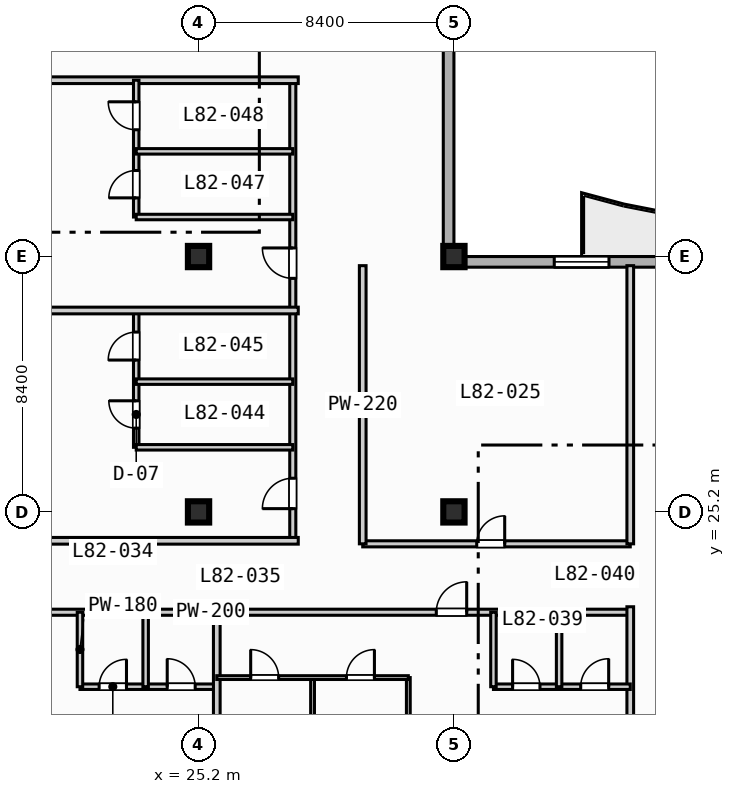
"""IFC4 building model, lengths in metres.
Left out: names, types, materials, properties, quantities, classifications, styles, units other than length and angle.
Written with IfcOpenShell. Run it as: python <this file> out.ifc"""

import sys

from ifc_helpers import new_model, si_unit, direction, frame, frame_2d, origin, origin_2d, place, context, subcontext, project, spatial, rectangle, extrude, element, fill, save


model = new_model("IFC4")
c1 = context("Model", 3, precision=1e-05, world=origin(), true_north=direction((0.0, 1.0)))
c2 = subcontext(c1, "Body", "Model", "MODEL_VIEW")
j1 = project(units=[si_unit("LENGTHUNIT", "METRE"), si_unit("PLANEANGLEUNIT", "RADIAN")], contexts=[c1])
p1 = place(None, origin())
s1 = spatial("IfcSite", under=j1, at=p1, CompositionType="ELEMENT")
p2 = place(p1, origin())
s2 = spatial("IfcBuilding", under=s1, at=p2, CompositionType="ELEMENT")
p3 = place(p2, frame((0.0, 0.0, 332.0)))
s3 = spatial("IfcBuildingStorey", under=s2, at=p3, CompositionType="ELEMENT", Elevation=332.0)
for number, where, z_axis, x_axis in (
    (1, (25.2, 25.2, 0.0), (0.0, 0.0, 1.0), (1.0, 0.0, 0.0)),
    (2, (25.2, 33.6, 0.0), (0.0, 0.0, 1.0), (1.0, 0.0, 0.0)),
    (3, (33.6, 25.2, 0.0), (0.0, 0.0, 1.0), (1.0, 0.0, 0.0)),
    (4, (33.6, 33.6, 0.0), (0.0, 0.0, 1.0), (1.0, 0.0, 0.0)),
):
    element("IfcColumn", number, at=place(p3, frame(where, z_axis=z_axis, x_axis=x_axis)), inside=s3, PredefinedType="COLUMN", context=c2, shape_type="SweptSolid", body=[
        extrude(rectangle(XDim=0.7, YDim=0.7, at=origin_2d()), origin(), (0.0, 0.0, 1.0), 3.9),
    ])
p4 = place(p3, frame((33.425, 72.425, 0.0), z_axis=(0.0, 0.0, 1.0), x_axis=(0.0, -1.0, 0.0)))
e5 = element("IfcWall", 5, at=p4, inside=s3, PredefinedType="STANDARD", context=c2, shape_type="SweptSolid", body=[
    extrude(rectangle(XDim=39.0, YDim=0.35, at=frame_2d((19.5, 0.0))), origin(), (0.0, 0.0, 1.0), 3.67),
])
p5 = place(p4, frame((5.9, 0.0, 0.85)))
e6 = element("IfcOpeningElement", 6, at=p5, cuts=e5, PredefinedType="OPENING", context=c2, shape_type="SweptSolid", body=[
    extrude(rectangle(XDim=1.8, YDim=1.8, at=frame_2d((0.9, 0.9))), frame((0.0, 0.185, 0.0), z_axis=(0.0, -1.0, 0.0), x_axis=(1.0, 0.0, 0.0)), (0.0, 0.0, 1.0), 0.37),
])
p6 = place(p3, frame((33.425, 33.425, 0.0), z_axis=(0.0, 0.0, 1.0), x_axis=(1.0, 0.0, 0.0)))
e7 = element("IfcWall", 7, at=p6, inside=s3, PredefinedType="STANDARD", context=c2, shape_type="SweptSolid", body=[
    extrude(rectangle(XDim=30.6, YDim=0.35, at=frame_2d((15.3, 0.0))), origin(), (0.0, 0.0, 1.0), 3.67),
])
p7 = place(p6, frame((12.075, 0.0, 0.0)))
e8 = element("IfcOpeningElement", 8, at=p7, cuts=e7, PredefinedType="OPENING", context=c2, shape_type="SweptSolid", body=[
    extrude(rectangle(XDim=1.4, YDim=2.2, at=frame_2d((0.7, 1.1))), frame((0.0, 0.185, 0.0), z_axis=(0.0, -1.0, 0.0), x_axis=(1.0, 0.0, 0.0)), (0.0, 0.0, 1.0), 0.37),
])
p8 = place(p6, frame((3.475, 0.0, 0.85)))
e9 = element("IfcOpeningElement", 9, at=p8, cuts=e7, PredefinedType="OPENING", context=c2, shape_type="SweptSolid", body=[
    extrude(rectangle(XDim=1.8, YDim=1.8, at=frame_2d((0.9, 0.9))), frame((0.0, 0.185, 0.0), z_axis=(0.0, -1.0, 0.0), x_axis=(1.0, 0.0, 0.0)), (0.0, 0.0, 1.0), 0.37),
])
p9 = place(p3, frame((30.6, 24.15, 0.0), z_axis=(0.0, 0.0, 1.0), x_axis=(1.0, 0.0, 0.0)))
e10 = element("IfcWall", 10, at=p9, inside=s3, PredefinedType="PARTITIONING", context=c2, shape_type="SweptSolid", body=[
    extrude(rectangle(XDim=8.8, YDim=0.2, at=frame_2d((4.4, 0.0))), origin(), (0.0, 0.0, 1.0), 3.67),
])
p10 = place(p9, frame((3.75, 0.0, 0.0)))
e11 = element("IfcOpeningElement", 11, at=p10, cuts=e10, PredefinedType="OPENING", context=c2, shape_type="SweptSolid", body=[
    extrude(rectangle(XDim=0.92, YDim=2.1, at=frame_2d((0.46, 1.05))), frame((0.0, 0.11, 0.0), z_axis=(0.0, -1.0, 0.0), x_axis=(1.0, 0.0, 0.0)), (0.0, 0.0, 1.0), 0.22),
])
for number, where, z_axis, x_axis in (
    (12, (30.6, 24.15, 0.0), (0.0, 0.0, 1.0), (0.0, 1.0, 0.0)),
    (13, (39.4, 24.15, 0.0), (0.0, 0.0, 1.0), (0.0, 1.0, 0.0)),
):
    element("IfcWall", number, at=place(p3, frame(where, z_axis=z_axis, x_axis=x_axis)), inside=s3, PredefinedType="PARTITIONING", context=c2, shape_type="SweptSolid", body=[
        extrude(rectangle(XDim=9.15, YDim=0.22, at=frame_2d((4.575, 0.0))), origin(), (0.0, 0.0, 1.0), 3.67),
    ])
p11 = place(p3, frame((11.8, 21.9, 0.0), z_axis=(0.0, 0.0, 1.0), x_axis=(1.0, 0.0, 0.0)))
e14 = element("IfcWall", 14, at=p11, inside=s3, PredefinedType="PARTITIONING", context=c2, shape_type="SweptSolid", body=[
    extrude(rectangle(XDim=27.6, YDim=0.2, at=frame_2d((13.8, 0.0))), origin(), (0.0, 0.0, 1.0), 3.67),
])
p12 = place(p11, frame((7.42, 0.0, 0.0)))
e15 = element("IfcOpeningElement", 15, at=p12, cuts=e14, PredefinedType="OPENING", context=c2, shape_type="SweptSolid", body=[
    extrude(rectangle(XDim=1.0, YDim=2.15, at=frame_2d((0.5, 1.075))), frame((0.0, 0.11, 0.0), z_axis=(0.0, -1.0, 0.0), x_axis=(1.0, 0.0, 0.0)), (0.0, 0.0, 1.0), 0.22),
])
p13 = place(p11, frame((21.22, 0.0, 0.0)))
e16 = element("IfcOpeningElement", 16, at=p13, cuts=e14, PredefinedType="OPENING", context=c2, shape_type="SweptSolid", body=[
    extrude(rectangle(XDim=1.0, YDim=2.15, at=frame_2d((0.5, 1.075))), frame((0.0, 0.11, 0.0), z_axis=(0.0, -1.0, 0.0), x_axis=(1.0, 0.0, 0.0)), (0.0, 0.0, 1.0), 0.22),
])
p14 = place(p3, frame((21.3, 19.45, 0.0), z_axis=(0.0, 0.0, 1.0), x_axis=(1.0, 0.0, 0.0)))
e17 = element("IfcWall", 17, at=p14, inside=s3, PredefinedType="PLUMBINGWALL", context=c2, shape_type="SweptSolid", body=[
    extrude(rectangle(XDim=4.5, YDim=0.18, at=frame_2d((2.25, 0.0))), origin(), (0.0, 0.0, 1.0), 3.67),
])
p15 = place(p14, frame((0.63, 0.0, 0.0)))
e18 = element("IfcOpeningElement", 18, at=p15, cuts=e17, PredefinedType="OPENING", context=c2, shape_type="SweptSolid", body=[
    extrude(rectangle(XDim=0.9, YDim=2.1, at=frame_2d((0.45, 1.05))), frame((0.0, 0.1, 0.0), z_axis=(0.0, -1.0, 0.0), x_axis=(1.0, 0.0, 0.0)), (0.0, 0.0, 1.0), 0.2),
])
p16 = place(p14, frame((2.87, 0.0, 0.0)))
e19 = element("IfcOpeningElement", 19, at=p16, cuts=e17, PredefinedType="OPENING", context=c2, shape_type="SweptSolid", body=[
    extrude(rectangle(XDim=0.92, YDim=2.1, at=frame_2d((0.46, 1.05))), frame((0.0, 0.1, 0.0), z_axis=(0.0, -1.0, 0.0), x_axis=(1.0, 0.0, 0.0)), (0.0, 0.0, 1.0), 0.2),
])
for number, where, z_axis, x_axis in (
    (20, (21.3, 19.45, 0.0), (0.0, 0.0, 1.0), (0.0, 1.0, 0.0)),
    (21, (23.46, 19.45, 0.0), (0.0, 0.0, 1.0), (0.0, 1.0, 0.0)),
):
    element("IfcWall", number, at=place(p3, frame(where, z_axis=z_axis, x_axis=x_axis)), inside=s3, PredefinedType="PLUMBINGWALL", context=c2, shape_type="SweptSolid", body=[
        extrude(rectangle(XDim=2.45, YDim=0.18, at=frame_2d((1.225, 0.0))), origin(), (0.0, 0.0, 1.0), 3.67),
    ])
for number, where, z_axis, x_axis in (
    (22, (25.8, 8.6, 0.0), (0.0, 0.0, 1.0), (0.0, 1.0, 0.0)),
    (23, (39.4, 8.6, 0.0), (0.0, 0.0, 1.0), (0.0, 1.0, 0.0)),
):
    element("IfcWall", number, at=place(p3, frame(where, z_axis=z_axis, x_axis=x_axis)), inside=s3, PredefinedType="PARTITIONING", context=c2, shape_type="SweptSolid", body=[
        extrude(rectangle(XDim=13.48, YDim=0.22, at=frame_2d((6.74, 0.0))), origin(), (0.0, 0.0, 1.0), 3.67),
    ])
p17 = place(p3, frame((34.9, 19.45, 0.0), z_axis=(0.0, 0.0, 1.0), x_axis=(1.0, 0.0, 0.0)))
e24 = element("IfcWall", 24, at=p17, inside=s3, PredefinedType="PLUMBINGWALL", context=c2, shape_type="SweptSolid", body=[
    extrude(rectangle(XDim=4.5, YDim=0.18, at=frame_2d((2.25, 0.0))), origin(), (0.0, 0.0, 1.0), 3.67),
])
p18 = place(p17, frame((0.63, 0.0, 0.0)))
e25 = element("IfcOpeningElement", 25, at=p18, cuts=e24, PredefinedType="OPENING", context=c2, shape_type="SweptSolid", body=[
    extrude(rectangle(XDim=0.9, YDim=2.1, at=frame_2d((0.45, 1.05))), frame((0.0, 0.1, 0.0), z_axis=(0.0, -1.0, 0.0), x_axis=(1.0, 0.0, 0.0)), (0.0, 0.0, 1.0), 0.2),
])
p19 = place(p17, frame((2.87, 0.0, 0.0)))
e26 = element("IfcOpeningElement", 26, at=p19, cuts=e24, PredefinedType="OPENING", context=c2, shape_type="SweptSolid", body=[
    extrude(rectangle(XDim=0.92, YDim=2.1, at=frame_2d((0.46, 1.05))), frame((0.0, 0.1, 0.0), z_axis=(0.0, -1.0, 0.0), x_axis=(1.0, 0.0, 0.0)), (0.0, 0.0, 1.0), 0.2),
])
for number, where, z_axis, x_axis in (
    (27, (34.9, 19.45, 0.0), (0.0, 0.0, 1.0), (0.0, 1.0, 0.0)),
    (28, (37.06, 19.45, 0.0), (0.0, 0.0, 1.0), (0.0, 1.0, 0.0)),
):
    element("IfcWall", number, at=place(p3, frame(where, z_axis=z_axis, x_axis=x_axis)), inside=s3, PredefinedType="PLUMBINGWALL", context=c2, shape_type="SweptSolid", body=[
        extrude(rectangle(XDim=2.45, YDim=0.18, at=frame_2d((1.225, 0.0))), origin(), (0.0, 0.0, 1.0), 3.67),
    ])
for number, where, z_axis, x_axis in (
    (29, (28.95, 8.75, 0.0), (0.0, 0.0, 1.0), (0.0, 1.0, 0.0)),
    (30, (32.1, 8.75, 0.0), (0.0, 0.0, 1.0), (0.0, 1.0, 0.0)),
):
    element("IfcWall", number, at=place(p3, frame(where, z_axis=z_axis, x_axis=x_axis)), inside=s3, PredefinedType="PARTITIONING", context=c2, shape_type="SweptSolid", body=[
        extrude(rectangle(XDim=11.0, YDim=0.125, at=frame_2d((5.5, 0.0))), origin(), (0.0, 0.0, 1.0), 3.67),
    ])
p20 = place(p3, frame((25.8, 19.75, 0.0), z_axis=(0.0, 0.0, 1.0), x_axis=(1.0, 0.0, 0.0)))
e31 = element("IfcWall", 31, at=p20, inside=s3, PredefinedType="PARTITIONING", context=c2, shape_type="SweptSolid", body=[
    extrude(rectangle(XDim=6.3, YDim=0.125, at=frame_2d((3.15, 0.0))), origin(), (0.0, 0.0, 1.0), 3.67),
])
p21 = place(p20, frame((1.115, 0.0, 0.0)))
e32 = element("IfcOpeningElement", 32, at=p21, cuts=e31, PredefinedType="OPENING", context=c2, shape_type="SweptSolid", body=[
    extrude(rectangle(XDim=0.92, YDim=2.1, at=frame_2d((0.46, 1.05))), frame((0.0, 0.073, 0.0), z_axis=(0.0, -1.0, 0.0), x_axis=(1.0, 0.0, 0.0)), (0.0, 0.0, 1.0), 0.145),
])
p22 = place(p20, frame((4.265, 0.0, 0.0)))
e33 = element("IfcOpeningElement", 33, at=p22, cuts=e31, PredefinedType="OPENING", context=c2, shape_type="SweptSolid", body=[
    extrude(rectangle(XDim=0.92, YDim=2.1, at=frame_2d((0.46, 1.05))), frame((0.0, 0.073, 0.0), z_axis=(0.0, -1.0, 0.0), x_axis=(1.0, 0.0, 0.0)), (0.0, 0.0, 1.0), 0.145),
])
p23 = place(p3, frame((28.3, 24.25, 0.0), z_axis=(0.0, 0.0, 1.0), x_axis=(0.0, 1.0, 0.0)))
e34 = element("IfcWall", 34, at=p23, inside=s3, PredefinedType="PARTITIONING", context=c2, shape_type="SweptSolid", body=[
    extrude(rectangle(XDim=15.15, YDim=0.2, at=frame_2d((7.575, 0.0))), origin(), (0.0, 0.0, 1.0), 3.67),
])
p24 = place(p23, frame((1.058, 0.0, 0.0)))
e35 = element("IfcOpeningElement", 35, at=p24, cuts=e34, PredefinedType="OPENING", context=c2, shape_type="SweptSolid", body=[
    extrude(rectangle(XDim=1.0, YDim=2.15, at=frame_2d((0.5, 1.075))), frame((0.0, 0.11, 0.0), z_axis=(0.0, -1.0, 0.0), x_axis=(1.0, 0.0, 0.0)), (0.0, 0.0, 1.0), 0.22),
])
p25 = place(p23, frame((8.633, 0.0, 0.0)))
e36 = element("IfcOpeningElement", 36, at=p25, cuts=e34, PredefinedType="OPENING", context=c2, shape_type="SweptSolid", body=[
    extrude(rectangle(XDim=1.0, YDim=2.15, at=frame_2d((0.5, 1.075))), frame((0.0, 0.11, 0.0), z_axis=(0.0, -1.0, 0.0), x_axis=(1.0, 0.0, 0.0)), (0.0, 0.0, 1.0), 0.22),
])
p26 = place(p3, frame((8.6, 24.25, 0.0), z_axis=(0.0, 0.0, 1.0), x_axis=(1.0, 0.0, 0.0)))
e37 = element("IfcWall", 37, at=p26, inside=s3, PredefinedType="PARTITIONING", context=c2, shape_type="SweptSolid", body=[
    extrude(rectangle(XDim=19.88, YDim=0.22, at=frame_2d((9.94, 0.0))), origin(), (0.0, 0.0, 1.0), 3.67),
])
p27 = place(p3, frame((23.15, 27.325, 0.0), z_axis=(0.0, 0.0, 1.0), x_axis=(0.0, 1.0, 0.0)))
e38 = element("IfcWall", 38, at=p27, inside=s3, PredefinedType="PLUMBINGWALL", context=c2, shape_type="SweptSolid", body=[
    extrude(rectangle(XDim=4.5, YDim=0.18, at=frame_2d((2.25, 0.0))), origin(), (0.0, 0.0, 1.0), 3.67),
])
p28 = place(p27, frame((0.63, 0.0, 0.0)))
e39 = element("IfcOpeningElement", 39, at=p28, cuts=e38, PredefinedType="OPENING", context=c2, shape_type="SweptSolid", body=[
    extrude(rectangle(XDim=0.9, YDim=2.1, at=frame_2d((0.45, 1.05))), frame((0.0, 0.1, 0.0), z_axis=(0.0, -1.0, 0.0), x_axis=(1.0, 0.0, 0.0)), (0.0, 0.0, 1.0), 0.2),
])
p29 = place(p27, frame((2.87, 0.0, 0.0)))
e40 = element("IfcOpeningElement", 40, at=p29, cuts=e38, PredefinedType="OPENING", context=c2, shape_type="SweptSolid", body=[
    extrude(rectangle(XDim=0.92, YDim=2.1, at=frame_2d((0.46, 1.05))), frame((0.0, 0.1, 0.0), z_axis=(0.0, -1.0, 0.0), x_axis=(1.0, 0.0, 0.0)), (0.0, 0.0, 1.0), 0.2),
])
for number, where, z_axis, x_axis in (
    (41, (23.15, 27.325, 0.0), (0.0, 0.0, 1.0), (1.0, 0.0, 0.0)),
    (42, (23.15, 29.485, 0.0), (0.0, 0.0, 1.0), (1.0, 0.0, 0.0)),
):
    element("IfcWall", number, at=place(p3, frame(where, z_axis=z_axis, x_axis=x_axis)), inside=s3, PredefinedType="PLUMBINGWALL", context=c2, shape_type="SweptSolid", body=[
        extrude(rectangle(XDim=5.15, YDim=0.18, at=frame_2d((2.575, 0.0))), origin(), (0.0, 0.0, 1.0), 3.67),
    ])
for number, where, z_axis, x_axis in (
    (43, (8.6, 31.825, 0.0), (0.0, 0.0, 1.0), (1.0, 0.0, 0.0)),
    (44, (8.6, 39.4, 0.0), (0.0, 0.0, 1.0), (1.0, 0.0, 0.0)),
):
    element("IfcWall", number, at=place(p3, frame(where, z_axis=z_axis, x_axis=x_axis)), inside=s3, PredefinedType="PARTITIONING", context=c2, shape_type="SweptSolid", body=[
        extrude(rectangle(XDim=19.88, YDim=0.22, at=frame_2d((9.94, 0.0))), origin(), (0.0, 0.0, 1.0), 3.67),
    ])
p30 = place(p3, frame((23.15, 34.9, 0.0), z_axis=(0.0, 0.0, 1.0), x_axis=(0.0, 1.0, 0.0)))
e45 = element("IfcWall", 45, at=p30, inside=s3, PredefinedType="PLUMBINGWALL", context=c2, shape_type="SweptSolid", body=[
    extrude(rectangle(XDim=4.5, YDim=0.18, at=frame_2d((2.25, 0.0))), origin(), (0.0, 0.0, 1.0), 3.67),
])
p31 = place(p30, frame((0.63, 0.0, 0.0)))
e46 = element("IfcOpeningElement", 46, at=p31, cuts=e45, PredefinedType="OPENING", context=c2, shape_type="SweptSolid", body=[
    extrude(rectangle(XDim=0.9, YDim=2.1, at=frame_2d((0.45, 1.05))), frame((0.0, 0.1, 0.0), z_axis=(0.0, -1.0, 0.0), x_axis=(1.0, 0.0, 0.0)), (0.0, 0.0, 1.0), 0.2),
])
p32 = place(p30, frame((2.87, 0.0, 0.0)))
e47 = element("IfcOpeningElement", 47, at=p32, cuts=e45, PredefinedType="OPENING", context=c2, shape_type="SweptSolid", body=[
    extrude(rectangle(XDim=0.92, YDim=2.1, at=frame_2d((0.46, 1.05))), frame((0.0, 0.1, 0.0), z_axis=(0.0, -1.0, 0.0), x_axis=(1.0, 0.0, 0.0)), (0.0, 0.0, 1.0), 0.2),
])
for number, where, z_axis, x_axis in (
    (48, (23.15, 34.9, 0.0), (0.0, 0.0, 1.0), (1.0, 0.0, 0.0)),
    (49, (23.15, 37.06, 0.0), (0.0, 0.0, 1.0), (1.0, 0.0, 0.0)),
):
    element("IfcWall", number, at=place(p3, frame(where, z_axis=z_axis, x_axis=x_axis)), inside=s3, PredefinedType="PLUMBINGWALL", context=c2, shape_type="SweptSolid", body=[
        extrude(rectangle(XDim=5.15, YDim=0.18, at=frame_2d((2.575, 0.0))), origin(), (0.0, 0.0, 1.0), 3.67),
    ])
p33 = place(p8, origin())
e50 = element("IfcWindow", 50, at=p33, inside=s3, PartitioningType="SINGLE_PANEL", PredefinedType="WINDOW", context=c2, shape_type="SweptSolid", body=[
    extrude(rectangle(XDim=1.8, YDim=1.8, at=frame_2d((0.9, 0.9))), frame((0.0, 0.03, 0.0), z_axis=(0.0, -1.0, 0.0), x_axis=(1.0, 0.0, 0.0)), (0.0, 0.0, 1.0), 0.06),
])
fill(e9, e50)
p34 = place(p10, origin())
e51 = element("IfcDoor", 51, at=p34, inside=s3, OperationType="SINGLE_SWING_RIGHT", PredefinedType="DOOR", context=c2, shape_type="SweptSolid", body=[
    extrude(rectangle(XDim=0.92, YDim=2.1, at=frame_2d((0.46, 1.05))), frame((0.0, 0.025, 0.0), z_axis=(0.0, -1.0, 0.0), x_axis=(1.0, 0.0, 0.0)), (0.0, 0.0, 1.0), 0.05),
])
fill(e11, e51)
p35 = place(p13, origin())
e52 = element("IfcDoor", 52, at=p35, inside=s3, OperationType="SINGLE_SWING_RIGHT", PredefinedType="DOOR", context=c2, shape_type="SweptSolid", body=[
    extrude(rectangle(XDim=1.0, YDim=2.15, at=frame_2d((0.5, 1.075))), frame((0.0, 0.025, 0.0), z_axis=(0.0, -1.0, 0.0), x_axis=(1.0, 0.0, 0.0)), (0.0, 0.0, 1.0), 0.05),
])
fill(e16, e52)
p36 = place(p15, origin())
e53 = element("IfcDoor", 53, at=p36, inside=s3, OperationType="SINGLE_SWING_RIGHT", PredefinedType="DOOR", context=c2, shape_type="SweptSolid", body=[
    extrude(rectangle(XDim=0.9, YDim=2.1, at=frame_2d((0.45, 1.05))), frame((0.0, 0.025, 0.0), z_axis=(0.0, -1.0, 0.0), x_axis=(1.0, 0.0, 0.0)), (0.0, 0.0, 1.0), 0.05),
])
fill(e18, e53)
p37 = place(p16, origin())
e54 = element("IfcDoor", 54, at=p37, inside=s3, OperationType="SINGLE_SWING_LEFT", PredefinedType="DOOR", context=c2, shape_type="SweptSolid", body=[
    extrude(rectangle(XDim=0.92, YDim=2.1, at=frame_2d((0.46, 1.05))), frame((0.0, 0.025, 0.0), z_axis=(0.0, -1.0, 0.0), x_axis=(1.0, 0.0, 0.0)), (0.0, 0.0, 1.0), 0.05),
])
fill(e19, e54)
p38 = place(p18, origin())
e55 = element("IfcDoor", 55, at=p38, inside=s3, OperationType="SINGLE_SWING_LEFT", PredefinedType="DOOR", context=c2, shape_type="SweptSolid", body=[
    extrude(rectangle(XDim=0.9, YDim=2.1, at=frame_2d((0.45, 1.05))), frame((0.0, 0.025, 0.0), z_axis=(0.0, -1.0, 0.0), x_axis=(1.0, 0.0, 0.0)), (0.0, 0.0, 1.0), 0.05),
])
fill(e25, e55)
p39 = place(p19, origin())
e56 = element("IfcDoor", 56, at=p39, inside=s3, OperationType="SINGLE_SWING_RIGHT", PredefinedType="DOOR", context=c2, shape_type="SweptSolid", body=[
    extrude(rectangle(XDim=0.92, YDim=2.1, at=frame_2d((0.46, 1.05))), frame((0.0, 0.025, 0.0), z_axis=(0.0, -1.0, 0.0), x_axis=(1.0, 0.0, 0.0)), (0.0, 0.0, 1.0), 0.05),
])
fill(e26, e56)
p40 = place(p21, origin())
e57 = element("IfcDoor", 57, at=p40, inside=s3, OperationType="SINGLE_SWING_LEFT", PredefinedType="DOOR", context=c2, shape_type="SweptSolid", body=[
    extrude(rectangle(XDim=0.92, YDim=2.1, at=frame_2d((0.46, 1.05))), frame((0.0, 0.025, 0.0), z_axis=(0.0, -1.0, 0.0), x_axis=(1.0, 0.0, 0.0)), (0.0, 0.0, 1.0), 0.05),
])
fill(e32, e57)
p41 = place(p22, origin())
e58 = element("IfcDoor", 58, at=p41, inside=s3, OperationType="SINGLE_SWING_RIGHT", PredefinedType="DOOR", context=c2, shape_type="SweptSolid", body=[
    extrude(rectangle(XDim=0.92, YDim=2.1, at=frame_2d((0.46, 1.05))), frame((0.0, 0.025, 0.0), z_axis=(0.0, -1.0, 0.0), x_axis=(1.0, 0.0, 0.0)), (0.0, 0.0, 1.0), 0.05),
])
fill(e33, e58)
p42 = place(p24, origin())
e59 = element("IfcDoor", 59, at=p42, inside=s3, OperationType="SINGLE_SWING_LEFT", PredefinedType="DOOR", context=c2, shape_type="SweptSolid", body=[
    extrude(rectangle(XDim=1.0, YDim=2.15, at=frame_2d((0.5, 1.075))), frame((0.0, 0.025, 0.0), z_axis=(0.0, -1.0, 0.0), x_axis=(1.0, 0.0, 0.0)), (0.0, 0.0, 1.0), 0.05),
])
fill(e35, e59)
p43 = place(p25, origin())
e60 = element("IfcDoor", 60, at=p43, inside=s3, OperationType="SINGLE_SWING_RIGHT", PredefinedType="DOOR", context=c2, shape_type="SweptSolid", body=[
    extrude(rectangle(XDim=1.0, YDim=2.15, at=frame_2d((0.5, 1.075))), frame((0.0, 0.025, 0.0), z_axis=(0.0, -1.0, 0.0), x_axis=(1.0, 0.0, 0.0)), (0.0, 0.0, 1.0), 0.05),
])
fill(e36, e60)
p44 = place(p28, origin())
e61 = element("IfcDoor", 61, at=p44, inside=s3, OperationType="SINGLE_SWING_RIGHT", PredefinedType="DOOR", context=c2, shape_type="SweptSolid", body=[
    extrude(rectangle(XDim=0.9, YDim=2.1, at=frame_2d((0.45, 1.05))), frame((0.0, 0.025, 0.0), z_axis=(0.0, -1.0, 0.0), x_axis=(1.0, 0.0, 0.0)), (0.0, 0.0, 1.0), 0.05),
])
fill(e39, e61)
p45 = place(p29, origin())
e62 = element("IfcDoor", 62, at=p45, inside=s3, OperationType="SINGLE_SWING_LEFT", PredefinedType="DOOR", context=c2, shape_type="SweptSolid", body=[
    extrude(rectangle(XDim=0.92, YDim=2.1, at=frame_2d((0.46, 1.05))), frame((0.0, 0.025, 0.0), z_axis=(0.0, -1.0, 0.0), x_axis=(1.0, 0.0, 0.0)), (0.0, 0.0, 1.0), 0.05),
])
fill(e40, e62)
p46 = place(p31, origin())
e63 = element("IfcDoor", 63, at=p46, inside=s3, OperationType="SINGLE_SWING_LEFT", PredefinedType="DOOR", context=c2, shape_type="SweptSolid", body=[
    extrude(rectangle(XDim=0.9, YDim=2.1, at=frame_2d((0.45, 1.05))), frame((0.0, 0.025, 0.0), z_axis=(0.0, -1.0, 0.0), x_axis=(1.0, 0.0, 0.0)), (0.0, 0.0, 1.0), 0.05),
])
fill(e46, e63)
p47 = place(p32, origin())
e64 = element("IfcDoor", 64, at=p47, inside=s3, OperationType="SINGLE_SWING_RIGHT", PredefinedType="DOOR", context=c2, shape_type="SweptSolid", body=[
    extrude(rectangle(XDim=0.92, YDim=2.1, at=frame_2d((0.46, 1.05))), frame((0.0, 0.025, 0.0), z_axis=(0.0, -1.0, 0.0), x_axis=(1.0, 0.0, 0.0)), (0.0, 0.0, 1.0), 0.05),
])
fill(e47, e64)
save(model, sys.argv[1])
